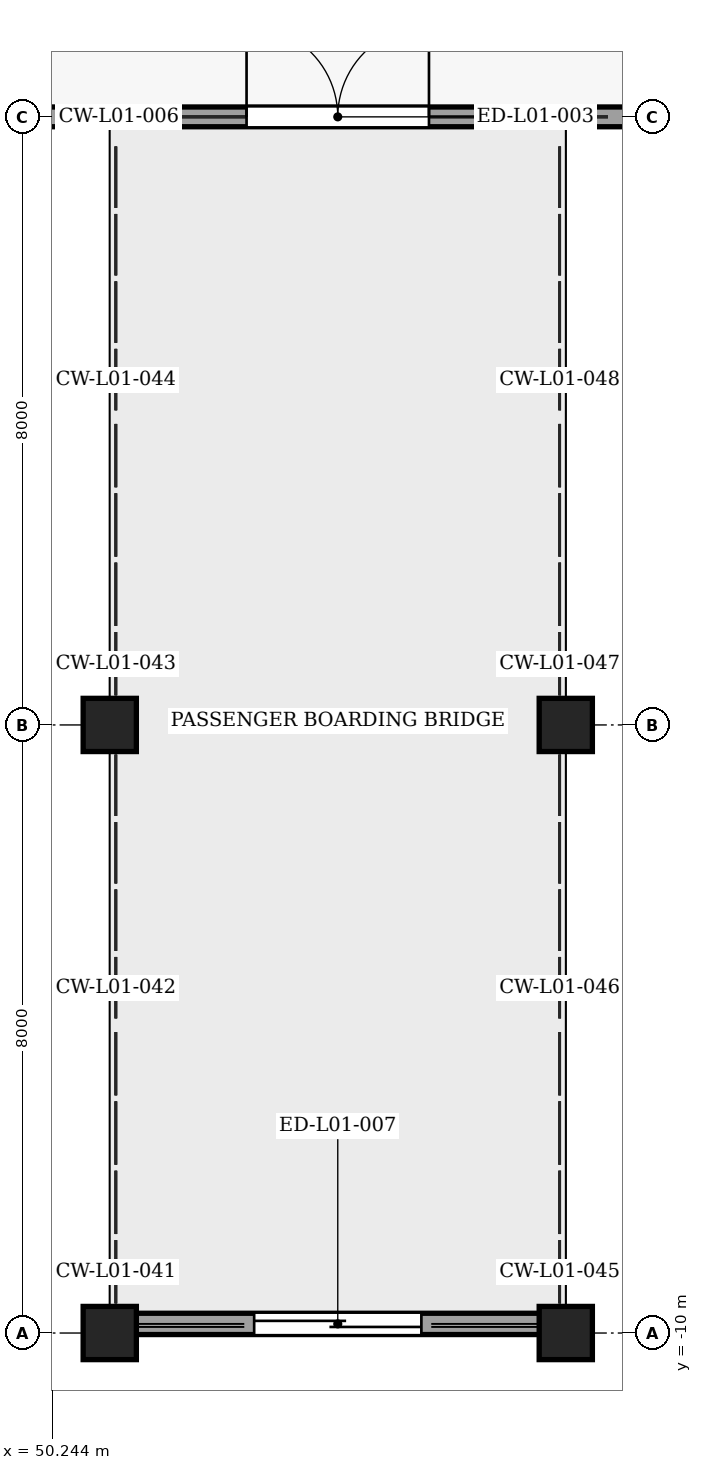
"""IFC4 building model, lengths in metres.
Left out: names, types, materials, properties, quantities, classifications, styles, units other than length and angle.
Written with IfcOpenShell. Run it as: python <this file> out.ifc"""

import sys

from ifc_helpers import new_model, si_unit, direction, frame, frame_2d, origin, origin_2d, place, context, subcontext, project, spatial, rectangle, extrude, element, fill, save


model = new_model("IFC4")
c1 = context("Model", 3, precision=1e-05, world=origin(), true_north=direction((0.0, 1.0)))
c2 = subcontext(c1, "Body", "Model", "MODEL_VIEW")
j1 = project(units=[si_unit("LENGTHUNIT", "METRE"), si_unit("PLANEANGLEUNIT", "RADIAN")], contexts=[c1])
p1 = place(None, origin())
s1 = spatial("IfcSite", under=j1, at=p1, CompositionType="ELEMENT")
p2 = place(p1, origin())
s2 = spatial("IfcBuilding", under=s1, at=p2, CompositionType="ELEMENT")
p3 = place(p2, origin())
s3 = spatial("IfcBuildingStorey", under=s2, at=p3, CompositionType="ELEMENT", Elevation=0.0)
for number, where, z_axis, x_axis in (
    (1, (51.0, -10.0, -0.45), (0.0, 0.0, 1.0), (1.0, 0.0, 0.0)),
    (2, (57.0, -10.0, -0.45), (0.0, 0.0, 1.0), (1.0, 0.0, 0.0)),
    (3, (51.0, -2.0, -0.45), (0.0, 0.0, 1.0), (1.0, 0.0, 0.0)),
    (4, (57.0, -2.0, -0.45), (0.0, 0.0, 1.0), (1.0, 0.0, 0.0)),
):
    element("IfcColumn", number, at=place(p3, frame(where, z_axis=z_axis, x_axis=x_axis)), inside=s3, PredefinedType="COLUMN", context=c2, shape_type="SweptSolid", body=[
        extrude(rectangle(XDim=0.7, YDim=0.7, at=origin_2d()), origin(), (0.0, 0.0, 1.0), 4.58),
    ])
p4 = place(p3, frame((50.172, 6.0, 0.0), z_axis=(0.0, 0.0, 1.0), x_axis=(1.0, 0.0, 0.0)))
e5 = element("IfcWall", 5, at=p4, inside=s3, PredefinedType="SOLIDWALL", context=c2, shape_type="SweptSolid", body=[
    extrude(rectangle(XDim=8.012, YDim=0.26, at=frame_2d((4.006, 0.0))), origin(), (0.0, 0.0, 1.0), 3.435),
])
p5 = place(p4, frame((2.628, 0.0, 0.0)))
e6 = element("IfcOpeningElement", 6, at=p5, cuts=e5, PredefinedType="OPENING", context=c2, shape_type="SweptSolid", body=[
    extrude(rectangle(XDim=2.4, YDim=2.4, at=frame_2d((1.2, 1.2))), frame((0.0, 0.14, 0.0), z_axis=(0.0, -1.0, 0.0), x_axis=(1.0, 0.0, 0.0)), (0.0, 0.0, 1.0), 0.28),
])
p6 = place(p3, frame((51.335, -9.88, 0.0), z_axis=(0.0, 0.0, 1.0), x_axis=(1.0, 0.0, 0.0)))
e7 = element("IfcWall", 7, at=p6, inside=s3, PredefinedType="SOLIDWALL", context=c2, shape_type="SweptSolid", body=[
    extrude(rectangle(XDim=5.33, YDim=0.28, at=frame_2d((2.665, 0.0))), origin(), (0.0, 0.0, 1.0), 3.772),
])
p7 = place(p6, frame((1.565, 0.0, 0.0)))
e8 = element("IfcOpeningElement", 8, at=p7, cuts=e7, PredefinedType="OPENING", context=c2, shape_type="SweptSolid", body=[
    extrude(rectangle(XDim=2.2, YDim=2.35, at=frame_2d((1.1, 1.175))), frame((0.0, 0.15, 0.0), z_axis=(0.0, -1.0, 0.0), x_axis=(1.0, 0.0, 0.0)), (0.0, 0.0, 1.0), 0.3),
])
p8 = place(p5, origin())
e9 = element("IfcDoor", 9, at=p8, inside=s3, OperationType="DOUBLE_DOOR_SINGLE_SWING", PredefinedType="DOOR", context=c2, shape_type="SweptSolid", body=[
    extrude(rectangle(XDim=2.4, YDim=2.4, at=frame_2d((1.2, 1.2))), frame((0.0, 0.025, 0.0), z_axis=(0.0, -1.0, 0.0), x_axis=(1.0, 0.0, 0.0)), (0.0, 0.0, 1.0), 0.05),
])
fill(e6, e9)
p9 = place(p7, origin())
e10 = element("IfcDoor", 10, at=p9, inside=s3, OperationType="SLIDING_TO_LEFT", PredefinedType="DOOR", context=c2, shape_type="SweptSolid", body=[
    extrude(rectangle(XDim=2.2, YDim=2.35, at=frame_2d((1.1, 1.175))), frame((0.0, 0.025, 0.0), z_axis=(0.0, -1.0, 0.0), x_axis=(1.0, 0.0, 0.0)), (0.0, 0.0, 1.0), 0.05),
])
fill(e8, e10)
save(model, sys.argv[1])
